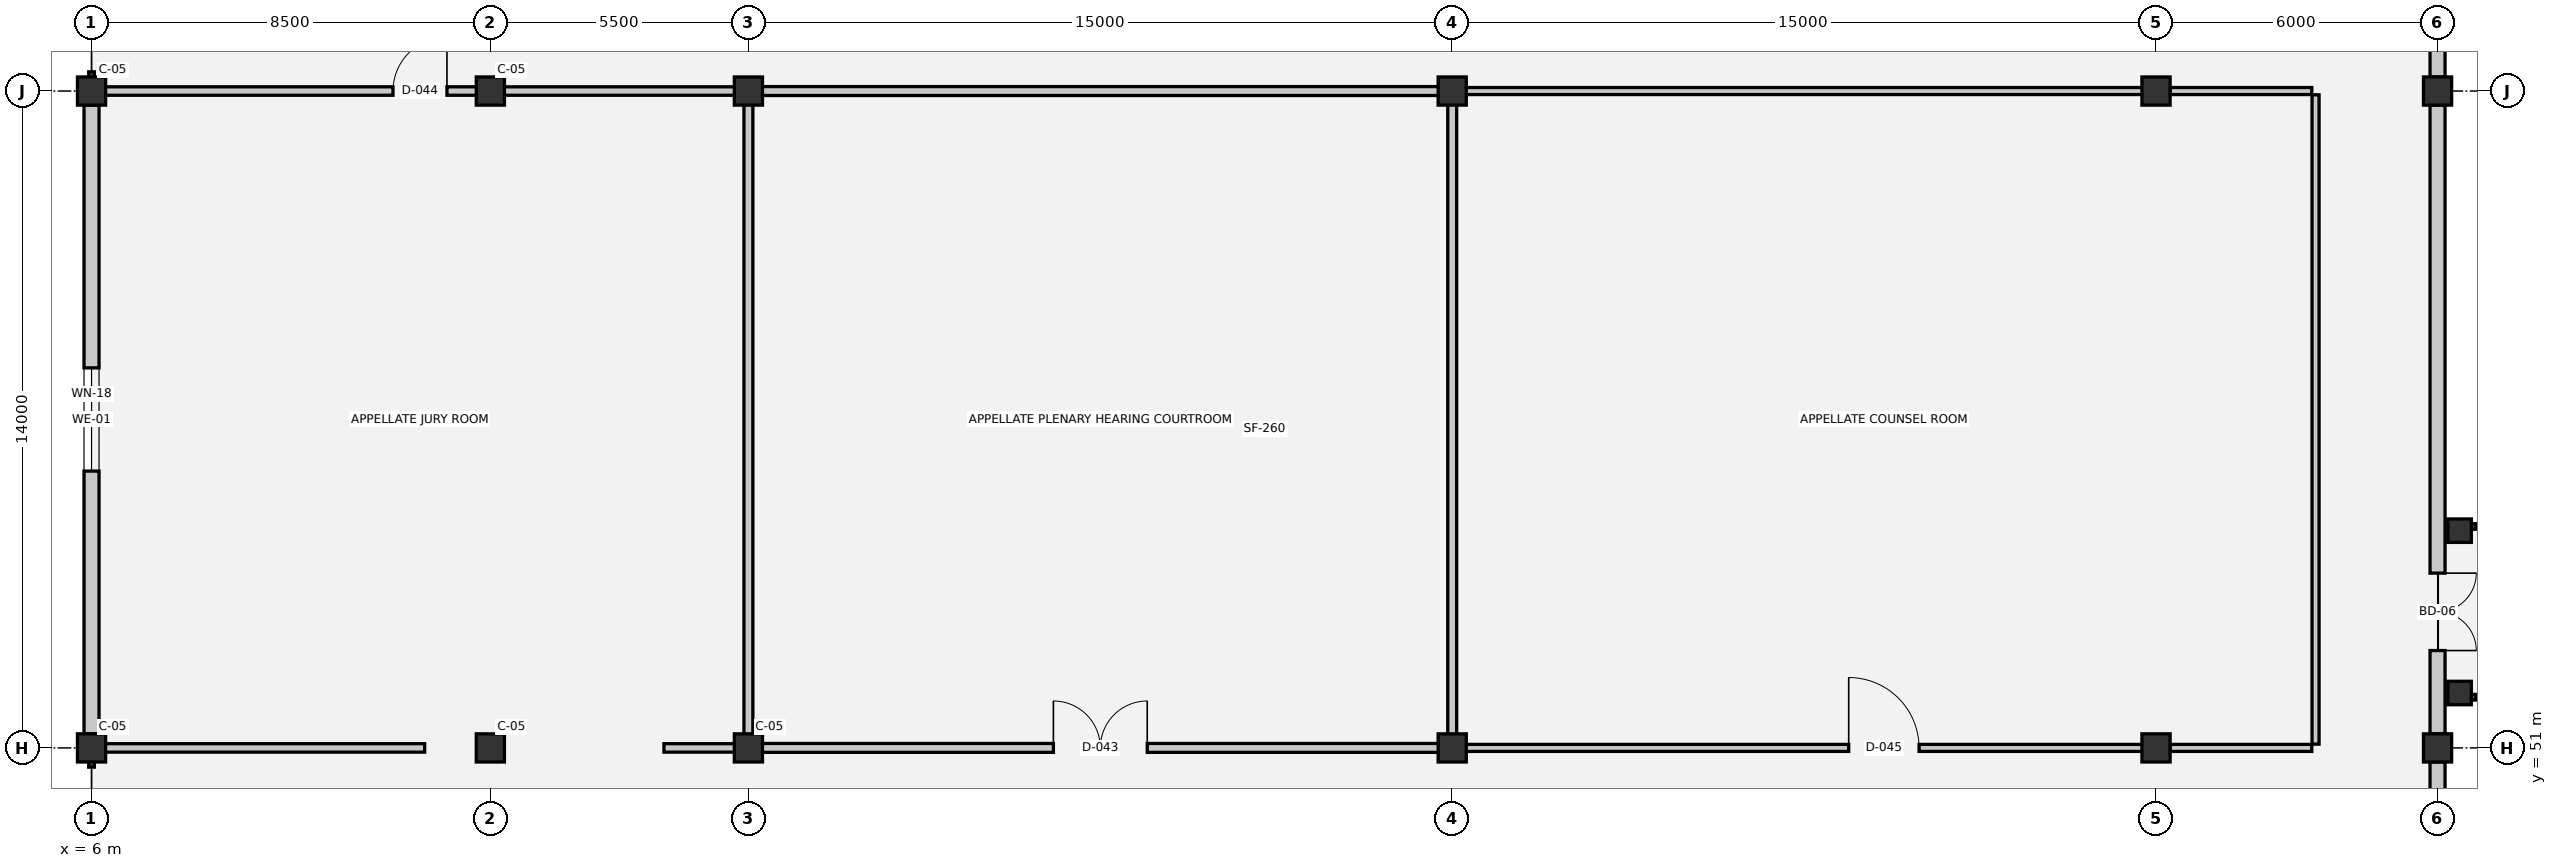
"""IFC4 building model, lengths in metres.
Left out: names, types, materials, properties, quantities, classifications, styles, units other than length and angle.
Written with IfcOpenShell. Run it as: python <this file> out.ifc"""

import sys

from ifc_helpers import new_model, si_unit, direction, frame, frame_2d, origin, origin_2d, place, context, subcontext, project, spatial, rectangle, extrude, element, fill, save


model = new_model("IFC4")
c1 = context("Model", 3, precision=1e-05, world=origin(), true_north=direction((0.0, 1.0)))
c2 = subcontext(c1, "Body", "Model", "MODEL_VIEW")
j1 = project(units=[si_unit("LENGTHUNIT", "METRE"), si_unit("PLANEANGLEUNIT", "RADIAN")], contexts=[c1])
p1 = place(None, origin())
s1 = spatial("IfcSite", under=j1, at=p1, CompositionType="ELEMENT")
p2 = place(p1, origin())
s2 = spatial("IfcBuilding", under=s1, at=p2, CompositionType="ELEMENT")
p3 = place(p2, frame((0.0, 0.0, 14.4)))
s3 = spatial("IfcBuildingStorey", under=s2, at=p3, CompositionType="ELEMENT", Elevation=14.4)
for number, where, z_axis, x_axis in (
    (1, (6.0, 51.0, 0.0), (0.0, 0.0, 1.0), (1.0, 0.0, 0.0)),
    (2, (6.0, 65.0, 0.0), (0.0, 0.0, 1.0), (1.0, 0.0, 0.0)),
    (3, (14.5, 51.0, 0.0), (0.0, 0.0, 1.0), (1.0, 0.0, 0.0)),
    (4, (14.5, 65.0, 0.0), (0.0, 0.0, 1.0), (1.0, 0.0, 0.0)),
    (5, (20.0, 51.0, 0.0), (0.0, 0.0, 1.0), (1.0, 0.0, 0.0)),
    (6, (20.0, 65.0, 0.0), (0.0, 0.0, 1.0), (1.0, 0.0, 0.0)),
    (7, (35.0, 51.0, 0.0), (0.0, 0.0, 1.0), (1.0, 0.0, 0.0)),
    (8, (35.0, 65.0, 0.0), (0.0, 0.0, 1.0), (1.0, 0.0, 0.0)),
    (9, (50.0, 51.0, 0.0), (0.0, 0.0, 1.0), (1.0, 0.0, 0.0)),
    (10, (50.0, 65.0, 0.0), (0.0, 0.0, 1.0), (1.0, 0.0, 0.0)),
    (11, (56.0, 51.0, 0.0), (0.0, 0.0, 1.0), (1.0, 0.0, 0.0)),
    (12, (56.0, 65.0, 0.0), (0.0, 0.0, 1.0), (1.0, 0.0, 0.0)),
):
    element("IfcColumn", number, at=place(p3, frame(where, z_axis=z_axis, x_axis=x_axis)), inside=s3, PredefinedType="COLUMN", context=c2, shape_type="SweptSolid", body=[
        extrude(rectangle(XDim=0.6, YDim=0.6, at=origin_2d()), origin(), (0.0, 0.0, 1.0), 3.9),
    ])
for number, where, z_axis, x_axis in (
    (13, (56.47, 52.17, 0.0), (0.0, 0.0, 1.0), (1.0, 0.0, 0.0)),
    (14, (56.47, 55.63, 0.0), (0.0, 0.0, 1.0), (1.0, 0.0, 0.0)),
):
    element("IfcColumn", number, at=place(p3, frame(where, z_axis=z_axis, x_axis=x_axis)), inside=s3, PredefinedType="COLUMN", context=c2, shape_type="SweptSolid", body=[
        extrude(rectangle(XDim=0.5, YDim=0.5, at=origin_2d()), origin(), (0.0, 0.0, 1.0), 3.67),
    ])
p4 = place(p3, frame((6.0, 51.3, 0.0), z_axis=(0.0, 0.0, 1.0), x_axis=(0.0, 1.0, 0.0)))
e15 = element("IfcWall", 15, at=p4, inside=s3, PredefinedType="SOLIDWALL", context=c2, shape_type="SweptSolid", body=[
    extrude(rectangle(XDim=13.4, YDim=0.32, at=frame_2d((6.7, 0.0))), origin(), (0.0, 0.0, 1.0), 2.46),
])
p5 = place(p4, frame((5.6, 0.0, 0.9)))
e16 = element("IfcOpeningElement", 16, at=p5, cuts=e15, PredefinedType="OPENING", context=c2, shape_type="SweptSolid", body=[
    extrude(rectangle(XDim=2.2, YDim=1.0, at=frame_2d((1.1, 0.5))), frame((0.0, 0.17, 0.0), z_axis=(0.0, -1.0, 0.0), x_axis=(1.0, 0.0, 0.0)), (0.0, 0.0, 1.0), 0.34),
])
p6 = place(p3, frame((56.0, 71.7, 0.0), z_axis=(0.0, 0.0, 1.0), x_axis=(0.0, -1.0, 0.0)))
e17 = element("IfcWall", 17, at=p6, inside=s3, PredefinedType="SOLIDWALL", context=c2, shape_type="SweptSolid", body=[
    extrude(rectangle(XDim=6.4, YDim=0.32, at=frame_2d((3.2, 0.0))), origin(), (0.0, 0.0, 1.0), 2.46),
])
p7 = place(p6, frame((2.08, 0.0, 0.9)))
e18 = element("IfcOpeningElement", 18, at=p7, cuts=e17, PredefinedType="OPENING", context=c2, shape_type="SweptSolid", body=[
    extrude(rectangle(XDim=2.2, YDim=1.0, at=frame_2d((1.1, 0.5))), frame((0.0, 0.17, 0.0), z_axis=(0.0, -1.0, 0.0), x_axis=(1.0, 0.0, 0.0)), (0.0, 0.0, 1.0), 0.34),
])
p8 = place(p3, frame((56.0, 64.7, 0.0), z_axis=(0.0, 0.0, 1.0), x_axis=(0.0, -1.0, 0.0)))
e19 = element("IfcWall", 19, at=p8, inside=s3, PredefinedType="SOLIDWALL", context=c2, shape_type="SweptSolid", body=[
    extrude(rectangle(XDim=13.4, YDim=0.32, at=frame_2d((6.7, 0.0))), origin(), (0.0, 0.0, 1.0), 2.46),
])
p9 = place(p8, frame((9.975, 0.0, 0.0)))
e20 = element("IfcOpeningElement", 20, at=p9, cuts=e19, PredefinedType="OPENING", context=c2, shape_type="SweptSolid", body=[
    extrude(rectangle(XDim=1.65, YDim=2.2, at=frame_2d((0.825, 1.1))), frame((0.0, 0.17, 0.0), z_axis=(0.0, -1.0, 0.0), x_axis=(1.0, 0.0, 0.0)), (0.0, 0.0, 1.0), 0.34),
])
p10 = place(p3, frame((56.0, 50.7, 0.0), z_axis=(0.0, 0.0, 1.0), x_axis=(0.0, -1.0, 0.0)))
e21 = element("IfcWall", 21, at=p10, inside=s3, PredefinedType="SOLIDWALL", context=c2, shape_type="SweptSolid", body=[
    extrude(rectangle(XDim=6.4, YDim=0.32, at=frame_2d((3.2, 0.0))), origin(), (0.0, 0.0, 1.0), 2.46),
])
p11 = place(p10, frame((2.1, 0.0, 0.9)))
e22 = element("IfcOpeningElement", 22, at=p11, cuts=e21, PredefinedType="OPENING", context=c2, shape_type="SweptSolid", body=[
    extrude(rectangle(XDim=2.2, YDim=1.0, at=frame_2d((1.1, 0.5))), frame((0.0, 0.17, 0.0), z_axis=(0.0, -1.0, 0.0), x_axis=(1.0, 0.0, 0.0)), (0.0, 0.0, 1.0), 0.34),
])
p12 = place(p3, frame((6.08, 51.0, 0.0), z_axis=(0.0, 0.0, 1.0), x_axis=(1.0, 0.0, 0.0)))
e23 = element("IfcWall", 23, at=p12, inside=s3, PredefinedType="PARTITIONING", context=c2, shape_type="SweptSolid", body=[
    extrude(rectangle(XDim=7.02, YDim=0.18, at=frame_2d((3.51, 0.0))), origin(), (0.0, 0.0, 1.0), 2.83),
])
p13 = place(p3, frame((18.2, 51.0, 0.0), z_axis=(0.0, 0.0, 1.0), x_axis=(1.0, 0.0, 0.0)))
e24 = element("IfcWall", 24, at=p13, inside=s3, PredefinedType="PARTITIONING", context=c2, shape_type="SweptSolid", body=[
    extrude(rectangle(XDim=1.72, YDim=0.18, at=frame_2d((0.86, 0.0))), origin(), (0.0, 0.0, 1.0), 2.83),
])
p14 = place(p3, frame((20.08, 51.0, 0.0), z_axis=(0.0, 0.0, 1.0), x_axis=(1.0, 0.0, 0.0)))
e25 = element("IfcWall", 25, at=p14, inside=s3, PredefinedType="PARTITIONING", context=c2, shape_type="SweptSolid", body=[
    extrude(rectangle(XDim=14.84, YDim=0.19, at=frame_2d((7.42, 0.0))), origin(), (0.0, 0.0, 1.0), 2.63),
])
p15 = place(p14, frame((6.42, 0.0, 0.0)))
e26 = element("IfcOpeningElement", 26, at=p15, cuts=e25, PredefinedType="OPENING", context=c2, shape_type="SweptSolid", body=[
    extrude(rectangle(XDim=2.0, YDim=2.35, at=frame_2d((1.0, 1.175))), frame((0.0, 0.105, 0.0), z_axis=(0.0, -1.0, 0.0), x_axis=(1.0, 0.0, 0.0)), (0.0, 0.0, 1.0), 0.21),
])
p16 = place(p3, frame((35.08, 51.0, 0.0), z_axis=(0.0, 0.0, 1.0), x_axis=(1.0, 0.0, 0.0)))
e27 = element("IfcWall", 27, at=p16, inside=s3, PredefinedType="PARTITIONING", context=c2, shape_type="SweptSolid", body=[
    extrude(rectangle(XDim=15.22, YDim=0.15, at=frame_2d((7.61, 0.0))), origin(), (0.0, 0.0, 1.0), 2.63),
])
p17 = place(p16, frame((8.37, 0.0, 0.0)))
e28 = element("IfcOpeningElement", 28, at=p17, cuts=e27, PredefinedType="OPENING", context=c2, shape_type="SweptSolid", body=[
    extrude(rectangle(XDim=1.5, YDim=2.25, at=frame_2d((0.75, 1.125))), frame((0.0, 0.085, 0.0), z_axis=(0.0, -1.0, 0.0), x_axis=(1.0, 0.0, 0.0)), (0.0, 0.0, 1.0), 0.17),
])
p18 = place(p3, frame((50.3, 51.0, 0.0), z_axis=(0.0, 0.0, 1.0), x_axis=(1.0, 0.0, 0.0)))
e29 = element("IfcWall", 29, at=p18, inside=s3, PredefinedType="PARTITIONING", context=c2, shape_type="SweptSolid", body=[
    extrude(rectangle(XDim=3.02, YDim=0.15, at=frame_2d((1.51, 0.0))), origin(), (0.0, 0.0, 1.0), 2.83),
])
p19 = place(p3, frame((6.08, 65.0, 0.0), z_axis=(0.0, 0.0, 1.0), x_axis=(1.0, 0.0, 0.0)))
e30 = element("IfcWall", 30, at=p19, inside=s3, PredefinedType="PARTITIONING", context=c2, shape_type="SweptSolid", body=[
    extrude(rectangle(XDim=13.84, YDim=0.18, at=frame_2d((6.92, 0.0))), origin(), (0.0, 0.0, 1.0), 2.83),
])
p20 = place(p19, frame((6.345, 0.0, 0.0)))
e31 = element("IfcOpeningElement", 31, at=p20, cuts=e30, PredefinedType="OPENING", context=c2, shape_type="SweptSolid", body=[
    extrude(rectangle(XDim=1.15, YDim=2.2, at=frame_2d((0.575, 1.1))), frame((0.0, 0.1, 0.0), z_axis=(0.0, -1.0, 0.0), x_axis=(1.0, 0.0, 0.0)), (0.0, 0.0, 1.0), 0.2),
])
p21 = place(p3, frame((20.08, 65.0, 0.0), z_axis=(0.0, 0.0, 1.0), x_axis=(1.0, 0.0, 0.0)))
e32 = element("IfcWall", 32, at=p21, inside=s3, PredefinedType="PARTITIONING", context=c2, shape_type="SweptSolid", body=[
    extrude(rectangle(XDim=14.84, YDim=0.19, at=frame_2d((7.42, 0.0))), origin(), (0.0, 0.0, 1.0), 2.63),
])
p22 = place(p3, frame((35.08, 65.0, 0.0), z_axis=(0.0, 0.0, 1.0), x_axis=(1.0, 0.0, 0.0)))
e33 = element("IfcWall", 33, at=p22, inside=s3, PredefinedType="PARTITIONING", context=c2, shape_type="SweptSolid", body=[
    extrude(rectangle(XDim=15.22, YDim=0.15, at=frame_2d((7.61, 0.0))), origin(), (0.0, 0.0, 1.0), 2.63),
])
p23 = place(p3, frame((50.3, 65.0, 0.0), z_axis=(0.0, 0.0, 1.0), x_axis=(1.0, 0.0, 0.0)))
e34 = element("IfcWall", 34, at=p23, inside=s3, PredefinedType="PARTITIONING", context=c2, shape_type="SweptSolid", body=[
    extrude(rectangle(XDim=3.02, YDim=0.15, at=frame_2d((1.51, 0.0))), origin(), (0.0, 0.0, 1.0), 2.83),
])
for number, where, z_axis, x_axis in (
    (35, (20.0, 51.08, 0.0), (0.0, 0.0, 1.0), (0.0, 1.0, 0.0)),
    (36, (35.0, 51.08, 0.0), (0.0, 0.0, 1.0), (0.0, 1.0, 0.0)),
):
    element("IfcWall", number, at=place(p3, frame(where, z_axis=z_axis, x_axis=x_axis)), inside=s3, PredefinedType="PARTITIONING", context=c2, shape_type="SweptSolid", body=[
        extrude(rectangle(XDim=13.84, YDim=0.19, at=frame_2d((6.92, 0.0))), origin(), (0.0, 0.0, 1.0), 2.48),
    ])
p24 = place(p3, frame((53.4, 51.08, 0.0), z_axis=(0.0, 0.0, 1.0), x_axis=(0.0, 1.0, 0.0)))
e37 = element("IfcWall", 37, at=p24, inside=s3, PredefinedType="PARTITIONING", context=c2, shape_type="SweptSolid", body=[
    extrude(rectangle(XDim=13.84, YDim=0.15, at=frame_2d((6.92, 0.0))), origin(), (0.0, 0.0, 1.0), 3.54),
])
p25 = place(p5, origin())
e38 = element("IfcWindow", 38, at=p25, inside=s3, PartitioningType="SINGLE_PANEL", PredefinedType="WINDOW", context=c2, shape_type="SweptSolid", body=[
    extrude(rectangle(XDim=2.2, YDim=1.0, at=frame_2d((1.1, 0.5))), frame((0.0, 0.03, 0.0), z_axis=(0.0, -1.0, 0.0), x_axis=(1.0, 0.0, 0.0)), (0.0, 0.0, 1.0), 0.06),
])
fill(e16, e38)
p26 = place(p9, origin())
e39 = element("IfcDoor", 39, at=p26, inside=s3, OperationType="DOUBLE_DOOR_SINGLE_SWING", PredefinedType="DOOR", context=c2, shape_type="SweptSolid", body=[
    extrude(rectangle(XDim=1.65, YDim=2.2, at=frame_2d((0.825, 1.1))), frame((0.0, 0.025, 0.0), z_axis=(0.0, -1.0, 0.0), x_axis=(1.0, 0.0, 0.0)), (0.0, 0.0, 1.0), 0.05),
])
fill(e20, e39)
p27 = place(p15, origin())
e40 = element("IfcDoor", 40, at=p27, inside=s3, OperationType="DOUBLE_DOOR_SINGLE_SWING", PredefinedType="DOOR", context=c2, shape_type="SweptSolid", body=[
    extrude(rectangle(XDim=2.0, YDim=2.35, at=frame_2d((1.0, 1.175))), frame((0.0, 0.025, 0.0), z_axis=(0.0, -1.0, 0.0), x_axis=(1.0, 0.0, 0.0)), (0.0, 0.0, 1.0), 0.05),
])
fill(e26, e40)
p28 = place(p20, origin())
e41 = element("IfcDoor", 41, at=p28, inside=s3, OperationType="SINGLE_SWING_RIGHT", PredefinedType="DOOR", context=c2, shape_type="SweptSolid", body=[
    extrude(rectangle(XDim=1.15, YDim=2.2, at=frame_2d((0.575, 1.1))), frame((0.0, 0.025, 0.0), z_axis=(0.0, -1.0, 0.0), x_axis=(1.0, 0.0, 0.0)), (0.0, 0.0, 1.0), 0.05),
])
fill(e31, e41)
p29 = place(p17, origin())
e42 = element("IfcDoor", 42, at=p29, inside=s3, OperationType="SINGLE_SWING_LEFT", PredefinedType="DOOR", context=c2, shape_type="SweptSolid", body=[
    extrude(rectangle(XDim=1.5, YDim=2.25, at=frame_2d((0.75, 1.125))), frame((0.0, 0.025, 0.0), z_axis=(0.0, -1.0, 0.0), x_axis=(1.0, 0.0, 0.0)), (0.0, 0.0, 1.0), 0.05),
])
fill(e28, e42)
save(model, sys.argv[1])
